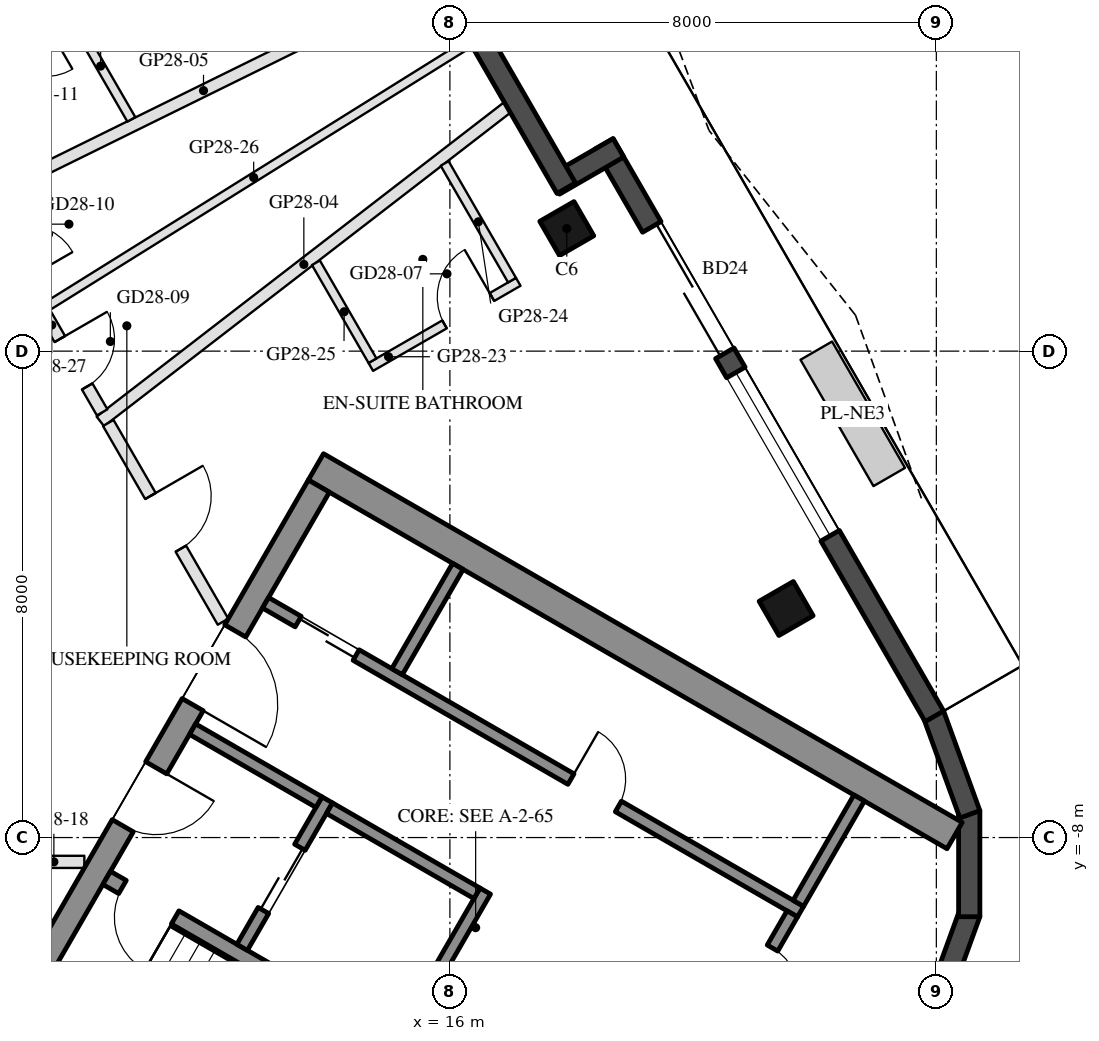
"""IFC4 building model, lengths in metres.
Left out: names, types, materials, properties, quantities, classifications, styles, units other than length and angle.
Written with IfcOpenShell. Run it as: python <this file> out.ifc"""

import sys

from ifc_helpers import new_model, si_unit, direction, frame, frame_2d, origin, origin_2d, place, context, subcontext, project, spatial, rectangle, hollow_rectangle, extrude, boolean, halfspace, element, fill, save


model = new_model("IFC4")
c1 = context("Model", 3, precision=1e-05, world=origin(), true_north=direction((0.0, 1.0)))
c2 = subcontext(c1, "Body", "Model", "MODEL_VIEW")
j1 = project(units=[si_unit("LENGTHUNIT", "METRE"), si_unit("PLANEANGLEUNIT", "RADIAN")], contexts=[c1])
p1 = place(None, origin())
s1 = spatial("IfcSite", under=j1, at=p1, CompositionType="ELEMENT")
p2 = place(p1, origin())
s2 = spatial("IfcBuilding", under=s1, at=p2, CompositionType="ELEMENT")
p3 = place(p2, frame((0.0, 0.0, 280.0)))
s3 = spatial("IfcBuildingStorey", under=s2, at=p3, CompositionType="ELEMENT", Elevation=280.0)
p4 = place(p3, frame((21.53, -4.233, 0.0), z_axis=(0.0, 0.0, 1.0), x_axis=(-0.5, 0.866025403784, 0.0)))
e1 = element("IfcColumn", 1, at=p4, inside=s3, PredefinedType="COLUMN", context=c2, shape_type="SweptSolid", body=[
    boolean("DIFFERENCE", extrude(hollow_rectangle(XDim=0.65, YDim=0.65, WallThickness=0.03, at=origin_2d()), origin(), (0.0, 0.0, 1.0), 3.7), halfspace(frame((0.0, 0.0, 0.047), z_axis=(0.0, 0.0, 1.0), x_axis=(1.0, 0.0, 0.0)), True)),
])
p5 = place(p3, frame((17.922, 2.016, 0.0), z_axis=(0.0, 0.0, 1.0), x_axis=(-0.5, 0.866025403784, 0.0)))
e2 = element("IfcColumn", 2, at=p5, inside=s3, PredefinedType="COLUMN", context=c2, shape_type="SweptSolid", body=[
    boolean("DIFFERENCE", extrude(hollow_rectangle(XDim=0.65, YDim=0.65, WallThickness=0.03, at=origin_2d()), origin(), (0.0, 0.0, 1.0), 3.7), halfspace(frame((0.0, 0.0, 0.04), z_axis=(0.0, 0.0, 1.0), x_axis=(1.0, 0.0, 0.0)), True)),
])
for number, where, z_axis, x_axis in (
    (3, (23.955, -10.882, 0.0), (0.0, 0.0, 1.0), (0.342, 0.94, 0.0)),
    (4, (24.541, -9.302, 0.0), (0.0, 0.0, 1.0), (0.0, 1.0, 0.0)),
    (5, (24.552, -7.618, 0.0), (0.0, 0.0, 1.0), (-0.342, 0.94, 0.0)),
):
    element("IfcWall", number, at=place(p3, frame(where, z_axis=z_axis, x_axis=x_axis)), inside=s3, PredefinedType="SOLIDWALL", context=c2, shape_type="SweptSolid", body=[
        extrude(rectangle(XDim=1.745, YDim=0.35, at=frame_2d((0.872, 0.0))), origin(), (0.0, 0.0, 1.0), 3.55),
    ])
p6 = place(p3, frame((23.968, -6.006, 0.0), z_axis=(0.0, 0.0, 1.0), x_axis=(-0.500008899612, 0.86602026553, 0.0)))
e6 = element("IfcWall", 6, at=p6, inside=s3, PredefinedType="SOLIDWALL", context=c2, shape_type="SweptSolid", body=[
    extrude(rectangle(XDim=10.87, YDim=0.35, at=frame_2d((5.435, 0.0))), origin(), (0.0, 0.0, 1.0), 3.55),
])
p7 = place(p6, frame((6.894, 0.0, 0.0)))
e7 = element("IfcOpeningElement", 7, at=p7, cuts=e6, PredefinedType="OPENING", context=c2, shape_type="SweptSolid", body=[
    extrude(rectangle(XDim=2.4, YDim=2.4, at=frame_2d((1.2, 1.2))), frame((0.0, 0.185, 0.0), z_axis=(0.0, -1.0, 0.0), x_axis=(1.0, 0.0, 0.0)), (0.0, 0.0, 1.0), 0.37),
])
p8 = place(p6, frame((3.429, 0.0, 0.3)))
e8 = element("IfcOpeningElement", 8, at=p8, cuts=e6, PredefinedType="OPENING", context=c2, shape_type="SweptSolid", body=[
    extrude(rectangle(XDim=3.1, YDim=2.65, at=frame_2d((1.55, 1.325))), frame((0.0, 0.185, 0.0), z_axis=(0.0, -1.0, 0.0), x_axis=(1.0, 0.0, 0.0)), (0.0, 0.0, 1.0), 0.37),
])
p9 = place(p3, frame((18.772, 3.344, 0.0), z_axis=(0.0, 0.0, 1.0), x_axis=(-0.866005645448, -0.500034220881, 0.0)))
e9 = element("IfcWall", 9, at=p9, inside=s3, PredefinedType="SOLIDWALL", context=c2, shape_type="SweptSolid", body=[
    extrude(rectangle(XDim=1.22, YDim=0.35, at=frame_2d((0.61, 0.0))), origin(), (0.0, 0.0, 1.0), 3.55),
])
p10 = place(p3, frame((17.913, 2.68, 0.0), z_axis=(0.0, 0.0, 1.0), x_axis=(-0.499985371027, 0.866033849661, 0.0)))
e10 = element("IfcWall", 10, at=p10, inside=s3, PredefinedType="SOLIDWALL", context=c2, shape_type="SweptSolid", body=[
    extrude(rectangle(XDim=6.055, YDim=0.35, at=frame_2d((3.028, 0.0))), origin(), (0.0, 0.0, 1.0), 3.55),
])
p11 = place(p10, frame((4.59, 0.0, 0.0)))
e11 = element("IfcOpeningElement", 11, at=p11, cuts=e10, PredefinedType="OPENING", context=c2, shape_type="SweptSolid", body=[
    extrude(rectangle(XDim=1.1, YDim=2.4, at=frame_2d((0.55, 1.2))), frame((0.0, 0.185, 0.0), z_axis=(0.0, -1.0, 0.0), x_axis=(1.0, 0.0, 0.0)), (0.0, 0.0, 1.0), 0.37),
])
p12 = place(p3, frame((13.797, -1.903, 0.0), z_axis=(0.0, 0.0, 1.0), x_axis=(0.866024688907, -0.500001238203, 0.0)))
e12 = element("IfcWall", 12, at=p12, inside=s3, PredefinedType="SHEAR", context=c2, shape_type="SweptSolid", body=[
    extrude(rectangle(XDim=12.129, YDim=0.5, at=frame_2d((6.064, 0.0))), origin(), (0.0, 0.0, 1.0), 3.5),
])
p13 = place(p3, frame((8.845, -10.88, 0.0), z_axis=(0.0, 0.0, 1.0), x_axis=(0.500004234368, 0.866022959057, 0.0)))
e13 = element("IfcWall", 13, at=p13, inside=s3, PredefinedType="SHEAR", context=c2, shape_type="SweptSolid", body=[
    extrude(rectangle(XDim=10.0, YDim=0.4, at=frame_2d((5.0, 0.0))), origin(), (0.0, 0.0, 1.0), 3.5),
])
p14 = place(p13, frame((3.55, 0.0, 0.0)))
e14 = element("IfcOpeningElement", 14, at=p14, cuts=e13, PredefinedType="OPENING", context=c2, shape_type="SweptSolid", body=[
    extrude(rectangle(XDim=1.1, YDim=2.1, at=frame_2d((0.55, 1.05))), frame((0.0, 0.21, 0.0), z_axis=(0.0, -1.0, 0.0), x_axis=(1.0, 0.0, 0.0)), (0.0, 0.0, 1.0), 0.42),
])
p15 = place(p13, frame((5.85, 0.0, 0.0)))
e15 = element("IfcOpeningElement", 15, at=p15, cuts=e13, PredefinedType="OPENING", context=c2, shape_type="SweptSolid", body=[
    extrude(rectangle(XDim=1.4, YDim=2.1, at=frame_2d((0.7, 1.05))), frame((0.0, 0.21, 0.0), z_axis=(0.0, -1.0, 0.0), x_axis=(1.0, 0.0, 0.0)), (0.0, 0.0, 1.0), 0.42),
])
p16 = place(p3, frame((10.356, -8.664, 0.0), z_axis=(0.0, 0.0, 1.0), x_axis=(0.866028629588, -0.499994412703, 0.0)))
e16 = element("IfcWall", 16, at=p16, inside=s3, PredefinedType="SHEAR", context=c2, shape_type="SweptSolid", body=[
    extrude(rectangle(XDim=6.45, YDim=0.25, at=frame_2d((3.225, 0.0))), origin(), (0.0, 0.0, 1.0), 3.5),
])
p17 = place(p16, frame((0.3, 0.0, 0.0)))
e17 = element("IfcOpeningElement", 17, at=p17, cuts=e16, PredefinedType="OPENING", context=c2, shape_type="SweptSolid", body=[
    extrude(rectangle(XDim=1.0, YDim=2.1, at=frame_2d((0.5, 1.05))), frame((0.0, 0.135, 0.0), z_axis=(0.0, -1.0, 0.0), x_axis=(1.0, 0.0, 0.0)), (0.0, 0.0, 1.0), 0.27),
])
p18 = place(p3, frame((15.181, -11.305, 0.0), z_axis=(0.0, 0.0, 1.0), x_axis=(0.49994636267, 0.866056369097, 0.0)))
e18 = element("IfcWall", 18, at=p18, inside=s3, PredefinedType="SHEAR", context=c2, shape_type="SweptSolid", body=[
    extrude(rectangle(XDim=2.8, YDim=0.2, at=frame_2d((1.4, 0.0))), origin(), (0.0, 0.0, 1.0), 3.5),
])
p19 = place(p3, frame((12.583, -9.805, 0.0), z_axis=(0.0, 0.0, 1.0), x_axis=(0.49994636267, 0.866056369097, 0.0)))
e19 = element("IfcWall", 19, at=p19, inside=s3, PredefinedType="SHEAR", context=c2, shape_type="SweptSolid", body=[
    extrude(rectangle(XDim=2.8, YDim=0.2, at=frame_2d((1.4, 0.0))), origin(), (0.0, 0.0, 1.0), 3.5),
])
p20 = place(p19, frame((0.7, 0.0, 0.0)))
e20 = element("IfcOpeningElement", 20, at=p20, cuts=e19, PredefinedType="OPENING", context=c2, shape_type="SweptSolid", body=[
    extrude(rectangle(XDim=1.2, YDim=2.1, at=frame_2d((0.6, 1.05))), frame((0.0, 0.11, 0.0), z_axis=(0.0, -1.0, 0.0), x_axis=(1.0, 0.0, 0.0)), (0.0, 0.0, 1.0), 0.22),
])
p21 = place(p3, frame((11.768, -6.217, 0.0), z_axis=(0.0, 0.0, 1.0), x_axis=(0.866050077142, -0.499957262057, 0.0)))
e21 = element("IfcWall", 21, at=p21, inside=s3, PredefinedType="SHEAR", context=c2, shape_type="SweptSolid", body=[
    extrude(rectangle(XDim=2.4, YDim=0.2, at=frame_2d((1.2, 0.0))), origin(), (0.0, 0.0, 1.0), 3.5),
])
p22 = place(p3, frame((14.02, -7.517, 0.0), z_axis=(0.0, 0.0, 1.0), x_axis=(0.866034573852, -0.49998411664, 0.0)))
e22 = element("IfcWall", 22, at=p22, inside=s3, PredefinedType="SHEAR", context=c2, shape_type="SweptSolid", body=[
    extrude(rectangle(XDim=2.8, YDim=0.2, at=frame_2d((1.4, 0.0))), origin(), (0.0, 0.0, 1.0), 3.5),
])
p23 = place(p3, frame((12.968, -4.138, 0.0), z_axis=(0.0, 0.0, 1.0), x_axis=(0.866028328073, -0.49999493495, 0.0)))
e23 = element("IfcWall", 23, at=p23, inside=s3, PredefinedType="SHEAR", context=c2, shape_type="SweptSolid", body=[
    extrude(rectangle(XDim=10.16, YDim=0.2, at=frame_2d((5.08, 0.0))), origin(), (0.0, 0.0, 1.0), 3.5),
])
p24 = place(p23, frame((0.62, 0.0, 0.0)))
e24 = element("IfcOpeningElement", 24, at=p24, cuts=e23, PredefinedType="OPENING", context=c2, shape_type="SweptSolid", body=[
    extrude(rectangle(XDim=1.1, YDim=2.1, at=frame_2d((0.55, 1.05))), frame((0.0, 0.11, 0.0), z_axis=(0.0, -1.0, 0.0), x_axis=(1.0, 0.0, 0.0)), (0.0, 0.0, 1.0), 0.22),
])
p25 = place(p23, frame((5.8, 0.0, 0.0)))
e25 = element("IfcOpeningElement", 25, at=p25, cuts=e23, PredefinedType="OPENING", context=c2, shape_type="SweptSolid", body=[
    extrude(rectangle(XDim=0.9, YDim=2.1, at=frame_2d((0.45, 1.05))), frame((0.0, 0.11, 0.0), z_axis=(0.0, -1.0, 0.0), x_axis=(1.0, 0.0, 0.0)), (0.0, 0.0, 1.0), 0.22),
])
p26 = place(p3, frame((20.43, -11.333, 0.0), z_axis=(0.0, 0.0, 1.0), x_axis=(0.500001309137, 0.866024647952, 0.0)))
e26 = element("IfcWall", 26, at=p26, inside=s3, PredefinedType="SHEAR", context=c2, shape_type="SweptSolid", body=[
    extrude(rectangle(XDim=2.4, YDim=0.2, at=frame_2d((1.2, 0.0))), origin(), (0.0, 0.0, 1.0), 3.5),
])
p27 = place(p26, frame((0.85, 0.0, 0.0)))
e27 = element("IfcOpeningElement", 27, at=p27, cuts=e26, PredefinedType="OPENING", context=c2, shape_type="SweptSolid", body=[
    extrude(rectangle(XDim=0.9, YDim=2.1, at=frame_2d((0.45, 1.05))), frame((0.0, 0.11, 0.0), z_axis=(0.0, -1.0, 0.0), x_axis=(1.0, 0.0, 0.0)), (0.0, 0.0, 1.0), 0.22),
])
for number, where, z_axis, x_axis in (
    (28, (15.131, -5.272, 0.0), (0.0, 0.0, 1.0), (0.5, 0.866, 0.0)),
    (29, (21.73, -9.082, 0.0), (0.0, 0.0, 1.0), (0.5, 0.866, 0.0)),
):
    element("IfcWall", number, at=place(p3, frame(where, z_axis=z_axis, x_axis=x_axis)), inside=s3, PredefinedType="SHEAR", context=c2, shape_type="SweptSolid", body=[
        extrude(rectangle(XDim=2.0, YDim=0.2, at=frame_2d((1.0, 0.0))), origin(), (0.0, 0.0, 1.0), 3.5),
    ])
p28 = place(p3, frame((16.945, 4.008, 0.0), z_axis=(0.0, 0.0, 1.0), x_axis=(-0.791722394734, -0.610881043801, 0.0)))
e30 = element("IfcWall", 30, at=p28, inside=s3, PredefinedType="PARTITIONING", context=c2, shape_type="SweptSolid", body=[
    extrude(rectangle(XDim=8.454, YDim=0.2, at=frame_2d((4.227, 0.0))), origin(), (0.0, 0.0, 1.0), 3.16),
])
p29 = place(p3, frame((15.715, 6.139, 0.0), z_axis=(0.0, 0.0, 1.0), x_axis=(-0.897120508699, -0.44178591294, 0.0)))
e31 = element("IfcWall", 31, at=p29, inside=s3, PredefinedType="PARTITIONING", context=c2, shape_type="SweptSolid", body=[
    extrude(rectangle(XDim=8.397, YDim=0.2, at=frame_2d((4.198, 0.0))), origin(), (0.0, 0.0, 1.0), 3.16),
])
p30 = place(p3, frame((9.988, -8.4, 0.0), z_axis=(0.0, 0.0, 1.0), x_axis=(-1.0, 0.0, 0.0)))
e32 = element("IfcWall", 32, at=p30, inside=s3, PredefinedType="PARTITIONING", context=c2, shape_type="SweptSolid", body=[
    extrude(rectangle(XDim=4.175, YDim=0.2, at=frame_2d((2.087, 0.0))), origin(), (0.0, 0.0, 1.0), 3.05),
])
p31 = place(p30, frame((1.587, 0.0, 0.0)))
e33 = element("IfcOpeningElement", 33, at=p31, cuts=e32, PredefinedType="OPENING", context=c2, shape_type="SweptSolid", body=[
    extrude(rectangle(XDim=1.0, YDim=2.1, at=frame_2d((0.5, 1.05))), frame((0.0, 0.11, 0.0), z_axis=(0.0, -1.0, 0.0), x_axis=(1.0, 0.0, 0.0)), (0.0, 0.0, 1.0), 0.22),
])
p32 = place(p3, frame((10.382, -1.182, 0.0), z_axis=(0.0, 0.0, 1.0), x_axis=(0.50002859319, -0.866008894869, 0.0)))
e34 = element("IfcWall", 34, at=p32, inside=s3, PredefinedType="PARTITIONING", context=c2, shape_type="SweptSolid", body=[
    extrude(rectangle(XDim=3.774, YDim=0.2, at=frame_2d((1.887, 0.0))), origin(), (0.0, 0.0, 1.0), 3.05),
])
p33 = place(p32, frame((1.387, 0.0, 0.0)))
e35 = element("IfcOpeningElement", 35, at=p33, cuts=e34, PredefinedType="OPENING", context=c2, shape_type="SweptSolid", body=[
    extrude(rectangle(XDim=1.0, YDim=2.1, at=frame_2d((0.5, 1.05))), frame((0.0, 0.11, 0.0), z_axis=(0.0, -1.0, 0.0), x_axis=(1.0, 0.0, 0.0)), (0.0, 0.0, 1.0), 0.22),
])
p34 = place(p3, frame((14.699, -0.26, 0.0), z_axis=(0.0, 0.0, 1.0), x_axis=(0.866034573852, 0.49998411664, 0.0)))
e36 = element("IfcWall", 36, at=p34, inside=s3, PredefinedType="PARTITIONING", context=c2, shape_type="SweptSolid", body=[
    extrude(rectangle(XDim=2.8, YDim=0.15, at=frame_2d((1.4, 0.0))), origin(), (0.0, 0.0, 1.0), 3.55),
])
p35 = place(p34, frame((1.4, 0.0, 0.0)))
e37 = element("IfcOpeningElement", 37, at=p35, cuts=e36, PredefinedType="OPENING", context=c2, shape_type="SweptSolid", body=[
    extrude(rectangle(XDim=0.9, YDim=2.1, at=frame_2d((0.45, 1.05))), frame((0.0, 0.085, 0.0), z_axis=(0.0, -1.0, 0.0), x_axis=(1.0, 0.0, 0.0)), (0.0, 0.0, 1.0), 0.17),
])
p36 = place(p3, frame((17.022, 1.167, 0.0), z_axis=(0.0, 0.0, 1.0), x_axis=(-0.499954515395, 0.866051662741, 0.0)))
e38 = element("IfcWall", 38, at=p36, inside=s3, PredefinedType="PARTITIONING", context=c2, shape_type="SweptSolid", body=[
    extrude(rectangle(XDim=2.216, YDim=0.15, at=frame_2d((1.108, 0.0))), origin(), (0.0, 0.0, 1.0), 3.05),
])
p37 = place(p3, frame((14.727, -0.158, 0.0), z_axis=(0.0, 0.0, 1.0), x_axis=(-0.499964847546, 0.866045698112, 0.0)))
e39 = element("IfcWall", 39, at=p37, inside=s3, PredefinedType="PARTITIONING", context=c2, shape_type="SweptSolid", body=[
    extrude(rectangle(XDim=1.86, YDim=0.15, at=frame_2d((0.93, 0.0))), origin(), (0.0, 0.0, 1.0), 3.05),
])
p38 = place(p3, frame((16.33, 5.074, 0.0), z_axis=(0.0, 0.0, 1.0), x_axis=(-0.848469139967, -0.52924485687, 0.0)))
e40 = element("IfcWall", 40, at=p38, inside=s3, PredefinedType="PARTITIONING", context=c2, shape_type="SweptSolid", body=[
    extrude(rectangle(XDim=8.384, YDim=0.15, at=frame_2d((4.192, 0.0))), origin(), (0.0, 0.0, 1.0), 3.16),
])
p39 = place(p3, frame((9.339, 0.625, 0.0), z_axis=(0.0, 0.0, 1.0), x_axis=(0.499999106059, -0.866025919901, 0.0)))
e41 = element("IfcWall", 41, at=p39, inside=s3, PredefinedType="PARTITIONING", context=c2, shape_type="SweptSolid", body=[
    extrude(rectangle(XDim=1.884, YDim=0.2, at=frame_2d((0.942, 0.0))), origin(), (0.0, 0.0, 1.0), 3.55),
])
p40 = place(p39, frame((0.492, 0.0, 0.0)))
e42 = element("IfcOpeningElement", 42, at=p40, cuts=e41, PredefinedType="OPENING", context=c2, shape_type="SweptSolid", body=[
    extrude(rectangle(XDim=0.9, YDim=2.1, at=frame_2d((0.45, 1.05))), frame((0.0, 0.11, 0.0), z_axis=(0.0, -1.0, 0.0), x_axis=(1.0, 0.0, 0.0)), (0.0, 0.0, 1.0), 0.22),
])
p41 = place(p3, frame((9.777, 5.666, 0.0), z_axis=(0.0, 0.0, 1.0), x_axis=(-0.865996816683, -0.500049511043, 0.0)))
e43 = element("IfcWall", 43, at=p41, inside=s3, PredefinedType="PARTITIONING", context=c2, shape_type="SweptSolid", body=[
    extrude(rectangle(XDim=2.8, YDim=0.15, at=frame_2d((1.4, 0.0))), origin(), (0.0, 0.0, 1.0), 3.05),
])
p42 = place(p41, frame((0.5, 0.0, 0.0)))
e44 = element("IfcOpeningElement", 44, at=p42, cuts=e43, PredefinedType="OPENING", context=c2, shape_type="SweptSolid", body=[
    extrude(rectangle(XDim=0.9, YDim=2.1, at=frame_2d((0.45, 1.05))), frame((0.0, 0.085, 0.0), z_axis=(0.0, -1.0, 0.0), x_axis=(1.0, 0.0, 0.0)), (0.0, 0.0, 1.0), 0.17),
])
p43 = place(p3, frame((10.761, 3.811, 0.0), z_axis=(0.0, 0.0, 1.0), x_axis=(-0.499941815747, 0.866058993873, 0.0)))
e45 = element("IfcWall", 45, at=p43, inside=s3, PredefinedType="PARTITIONING", context=c2, shape_type="SweptSolid", body=[
    extrude(rectangle(XDim=2.023, YDim=0.15, at=frame_2d((1.012, 0.0))), origin(), (0.0, 0.0, 1.0), 3.05),
])
p44 = place(p7, frame((2.4, 0.0, 0.0), z_axis=(0.0, 0.0, 1.0), x_axis=(-1.0, 0.0, 0.0)))
e46 = element("IfcDoor", 46, at=p44, inside=s3, OperationType="SLIDING_TO_LEFT", PredefinedType="DOOR", context=c2, shape_type="SweptSolid", body=[
    extrude(rectangle(XDim=2.4, YDim=2.4, at=frame_2d((1.2, 1.2))), frame((0.0, 0.025, 0.0), z_axis=(0.0, -1.0, 0.0), x_axis=(1.0, 0.0, 0.0)), (0.0, 0.0, 1.0), 0.05),
])
fill(e7, e46)
p45 = place(p8, origin())
e47 = element("IfcWindow", 47, at=p45, inside=s3, PartitioningType="SINGLE_PANEL", PredefinedType="WINDOW", context=c2, shape_type="SweptSolid", body=[
    extrude(rectangle(XDim=3.1, YDim=2.65, at=frame_2d((1.55, 1.325))), frame((0.0, 0.03, 0.0), z_axis=(0.0, -1.0, 0.0), x_axis=(1.0, 0.0, 0.0)), (0.0, 0.0, 1.0), 0.06),
])
fill(e8, e47)
p46 = place(p20, origin())
e48 = element("IfcDoor", 48, at=p46, inside=s3, OperationType="DOUBLE_DOOR_SLIDING", PredefinedType="DOOR", context=c2, shape_type="SweptSolid", body=[
    extrude(rectangle(XDim=1.2, YDim=2.1, at=frame_2d((0.6, 1.05))), frame((0.0, 0.025, 0.0), z_axis=(0.0, -1.0, 0.0), x_axis=(1.0, 0.0, 0.0)), (0.0, 0.0, 1.0), 0.05),
])
fill(e20, e48)
p47 = place(p24, origin())
e49 = element("IfcDoor", 49, at=p47, inside=s3, OperationType="DOUBLE_DOOR_SLIDING", PredefinedType="DOOR", context=c2, shape_type="SweptSolid", body=[
    extrude(rectangle(XDim=1.1, YDim=2.1, at=frame_2d((0.55, 1.05))), frame((0.0, 0.025, 0.0), z_axis=(0.0, -1.0, 0.0), x_axis=(1.0, 0.0, 0.0)), (0.0, 0.0, 1.0), 0.05),
])
fill(e24, e49)
p48 = place(p25, origin())
e50 = element("IfcDoor", 50, at=p48, inside=s3, OperationType="SINGLE_SWING_LEFT", PredefinedType="DOOR", context=c2, shape_type="SweptSolid", body=[
    extrude(rectangle(XDim=0.9, YDim=2.1, at=frame_2d((0.45, 1.05))), frame((0.0, 0.025, 0.0), z_axis=(0.0, -1.0, 0.0), x_axis=(1.0, 0.0, 0.0)), (0.0, 0.0, 1.0), 0.05),
])
fill(e25, e50)
p49 = place(p27, frame((0.9, 0.0, 0.0), z_axis=(0.0, 0.0, 1.0), x_axis=(-1.0, 0.0, 0.0)))
e51 = element("IfcDoor", 51, at=p49, inside=s3, OperationType="SINGLE_SWING_RIGHT", PredefinedType="DOOR", context=c2, shape_type="SweptSolid", body=[
    extrude(rectangle(XDim=0.9, YDim=2.1, at=frame_2d((0.45, 1.05))), frame((0.0, 0.025, 0.0), z_axis=(0.0, -1.0, 0.0), x_axis=(1.0, 0.0, 0.0)), (0.0, 0.0, 1.0), 0.05),
])
fill(e27, e51)
p50 = place(p14, frame((1.1, 0.0, 0.0), z_axis=(0.0, 0.0, 1.0), x_axis=(-1.0, 0.0, 0.0)))
e52 = element("IfcDoor", 52, at=p50, inside=s3, OperationType="SINGLE_SWING_LEFT", PredefinedType="DOOR", context=c2, shape_type="SweptSolid", body=[
    extrude(rectangle(XDim=1.1, YDim=2.1, at=frame_2d((0.55, 1.05))), frame((0.0, 0.025, 0.0), z_axis=(0.0, -1.0, 0.0), x_axis=(1.0, 0.0, 0.0)), (0.0, 0.0, 1.0), 0.05),
])
fill(e14, e52)
p51 = place(p15, frame((1.4, 0.0, 0.0), z_axis=(0.0, 0.0, 1.0), x_axis=(-1.0, 0.0, 0.0)))
e53 = element("IfcDoor", 53, at=p51, inside=s3, OperationType="DOUBLE_DOOR_SINGLE_SWING", PredefinedType="DOOR", context=c2, shape_type="SweptSolid", body=[
    extrude(rectangle(XDim=1.4, YDim=2.1, at=frame_2d((0.7, 1.05))), frame((0.0, 0.025, 0.0), z_axis=(0.0, -1.0, 0.0), x_axis=(1.0, 0.0, 0.0)), (0.0, 0.0, 1.0), 0.05),
])
fill(e15, e53)
p52 = place(p17, frame((1.0, 0.0, 0.0), z_axis=(0.0, 0.0, 1.0), x_axis=(-1.0, 0.0, 0.0)))
e54 = element("IfcDoor", 54, at=p52, inside=s3, OperationType="SINGLE_SWING_LEFT", PredefinedType="DOOR", context=c2, shape_type="SweptSolid", body=[
    extrude(rectangle(XDim=1.0, YDim=2.1, at=frame_2d((0.5, 1.05))), frame((0.0, 0.025, 0.0), z_axis=(0.0, -1.0, 0.0), x_axis=(1.0, 0.0, 0.0)), (0.0, 0.0, 1.0), 0.05),
])
fill(e17, e54)
p53 = place(p35, origin())
e55 = element("IfcDoor", 55, at=p53, inside=s3, OperationType="SINGLE_SWING_RIGHT", PredefinedType="DOOR", context=c2, shape_type="SweptSolid", body=[
    extrude(rectangle(XDim=0.9, YDim=2.1, at=frame_2d((0.45, 1.05))), frame((0.0, 0.025, 0.0), z_axis=(0.0, -1.0, 0.0), x_axis=(1.0, 0.0, 0.0)), (0.0, 0.0, 1.0), 0.05),
])
fill(e37, e55)
p54 = place(p33, origin())
e56 = element("IfcDoor", 56, at=p54, inside=s3, OperationType="SINGLE_SWING_LEFT", PredefinedType="DOOR", context=c2, shape_type="SweptSolid", body=[
    extrude(rectangle(XDim=1.0, YDim=2.1, at=frame_2d((0.5, 1.05))), frame((0.0, 0.025, 0.0), z_axis=(0.0, -1.0, 0.0), x_axis=(1.0, 0.0, 0.0)), (0.0, 0.0, 1.0), 0.05),
])
fill(e35, e56)
p55 = place(p40, origin())
e57 = element("IfcDoor", 57, at=p55, inside=s3, OperationType="SINGLE_SWING_LEFT", PredefinedType="DOOR", context=c2, shape_type="SweptSolid", body=[
    extrude(rectangle(XDim=0.9, YDim=2.1, at=frame_2d((0.45, 1.05))), frame((0.0, 0.025, 0.0), z_axis=(0.0, -1.0, 0.0), x_axis=(1.0, 0.0, 0.0)), (0.0, 0.0, 1.0), 0.05),
])
fill(e42, e57)
save(model, sys.argv[1])
